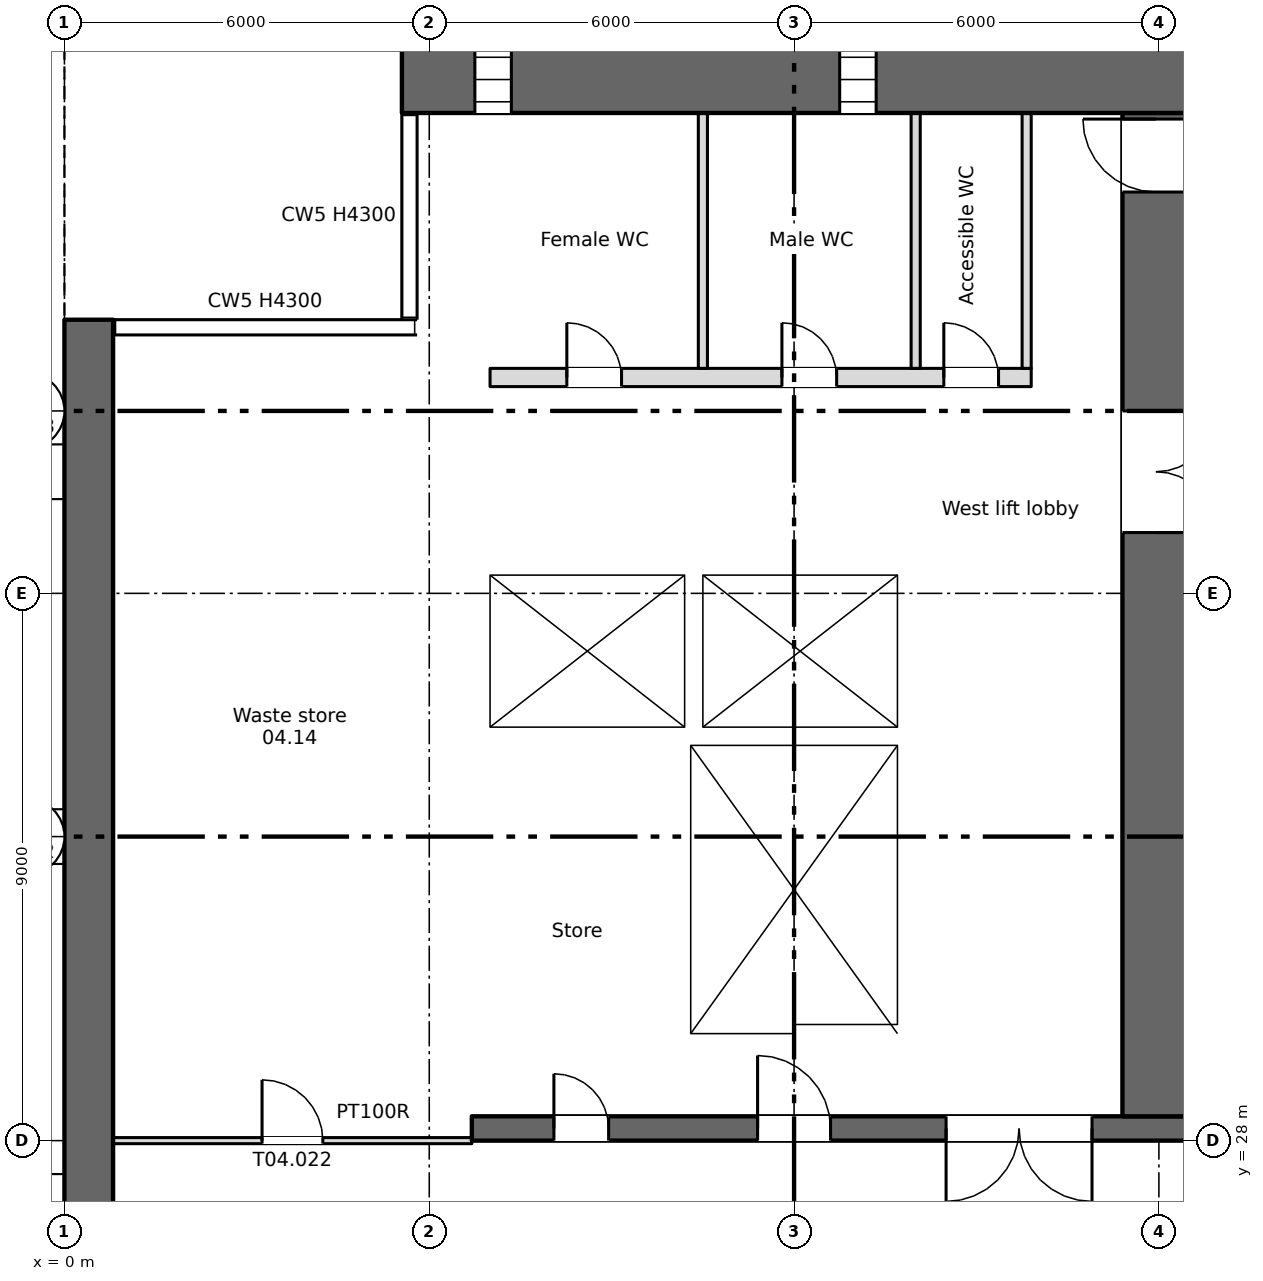
"""IFC4 building model, lengths in metres.
Left out: names, types, materials, properties, quantities, classifications, styles, units other than length and angle.
Written with IfcOpenShell. Run it as: python <this file> out.ifc"""

import sys

from ifc_helpers import new_model, si_unit, direction, frame, frame_2d, origin, place, context, subcontext, project, spatial, rectangle, extrude, element, fill, save


model = new_model("IFC4")
c1 = context("Model", 3, precision=1e-05, world=origin(), true_north=direction((0.0, 1.0)))
c2 = subcontext(c1, "Body", "Model", "MODEL_VIEW")
j1 = project(units=[si_unit("LENGTHUNIT", "METRE"), si_unit("PLANEANGLEUNIT", "RADIAN")], contexts=[c1])
p1 = place(None, origin())
s1 = spatial("IfcSite", under=j1, at=p1, CompositionType="ELEMENT")
p2 = place(p1, origin())
s2 = spatial("IfcBuilding", under=s1, at=p2, CompositionType="ELEMENT")
p3 = place(p2, frame((0.0, 0.0, 6.5)))
s3 = spatial("IfcBuildingStorey", under=s2, at=p3, CompositionType="ELEMENT", Elevation=6.5)
p4 = place(p3, frame((0.4, 4.5, 0.0), z_axis=(0.0, 0.0, 1.0), x_axis=(0.0, 1.0, 0.0)))
e1 = element("IfcWall", 1, at=p4, inside=s3, PredefinedType="SHEAR", context=c2, shape_type="SweptSolid", body=[
    extrude(rectangle(XDim=37.0, YDim=0.8, at=frame_2d((18.5, 0.0))), origin(), (0.0, 0.0, 1.0), 4.3),
])
p5 = place(p4, frame((1.2, 0.0, 0.6)))
e2 = element("IfcOpeningElement", 2, at=p5, cuts=e1, PredefinedType="OPENING", context=c2, shape_type="SweptSolid", body=[
    extrude(rectangle(XDim=0.6, YDim=2.7, at=frame_2d((0.3, 1.35))), frame((0.0, 0.41, 0.0), z_axis=(0.0, -1.0, 0.0), x_axis=(1.0, 0.0, 0.0)), (0.0, 0.0, 1.0), 0.82),
])
p6 = place(p4, frame((7.2, 0.0, 0.6)))
e3 = element("IfcOpeningElement", 3, at=p6, cuts=e1, PredefinedType="OPENING", context=c2, shape_type="SweptSolid", body=[
    extrude(rectangle(XDim=0.6, YDim=2.7, at=frame_2d((0.3, 1.35))), frame((0.0, 0.41, 0.0), z_axis=(0.0, -1.0, 0.0), x_axis=(1.0, 0.0, 0.0)), (0.0, 0.0, 1.0), 0.82),
])
p7 = place(p4, frame((13.2, 0.0, 0.6)))
e4 = element("IfcOpeningElement", 4, at=p7, cuts=e1, PredefinedType="OPENING", context=c2, shape_type="SweptSolid", body=[
    extrude(rectangle(XDim=0.6, YDim=2.7, at=frame_2d((0.3, 1.35))), frame((0.0, 0.41, 0.0), z_axis=(0.0, -1.0, 0.0), x_axis=(1.0, 0.0, 0.0)), (0.0, 0.0, 1.0), 0.82),
])
p8 = place(p4, frame((19.2, 0.0, 0.6)))
e5 = element("IfcOpeningElement", 5, at=p8, cuts=e1, PredefinedType="OPENING", context=c2, shape_type="SweptSolid", body=[
    extrude(rectangle(XDim=0.6, YDim=2.7, at=frame_2d((0.3, 1.35))), frame((0.0, 0.41, 0.0), z_axis=(0.0, -1.0, 0.0), x_axis=(1.0, 0.0, 0.0)), (0.0, 0.0, 1.0), 0.82),
])
p9 = place(p3, frame((5.55, 45.45, 0.0), z_axis=(0.0, 0.0, 1.0), x_axis=(1.0, 0.0, 0.0)))
e6 = element("IfcWall", 6, at=p9, inside=s3, PredefinedType="SHEAR", context=c2, shape_type="SweptSolid", body=[
    extrude(rectangle(XDim=66.9, YDim=1.1, at=frame_2d((33.45, 0.0))), origin(), (0.0, 0.0, 1.0), 4.3),
])
p10 = place(p9, frame((1.2, 0.0, 0.6)))
e7 = element("IfcOpeningElement", 7, at=p10, cuts=e6, PredefinedType="OPENING", context=c2, shape_type="SweptSolid", body=[
    extrude(rectangle(XDim=0.6, YDim=2.7, at=frame_2d((0.3, 1.35))), frame((0.0, 0.56, 0.0), z_axis=(0.0, -1.0, 0.0), x_axis=(1.0, 0.0, 0.0)), (0.0, 0.0, 1.0), 1.12),
])
p11 = place(p9, frame((7.2, 0.0, 0.6)))
e8 = element("IfcOpeningElement", 8, at=p11, cuts=e6, PredefinedType="OPENING", context=c2, shape_type="SweptSolid", body=[
    extrude(rectangle(XDim=0.6, YDim=2.7, at=frame_2d((0.3, 1.35))), frame((0.0, 0.56, 0.0), z_axis=(0.0, -1.0, 0.0), x_axis=(1.0, 0.0, 0.0)), (0.0, 0.0, 1.0), 1.12),
])
p12 = place(p9, frame((61.2, 0.0, 0.6)))
e9 = element("IfcOpeningElement", 9, at=p12, cuts=e6, PredefinedType="OPENING", context=c2, shape_type="SweptSolid", body=[
    extrude(rectangle(XDim=0.6, YDim=2.7, at=frame_2d((0.3, 1.35))), frame((0.0, 0.56, 0.0), z_axis=(0.0, -1.0, 0.0), x_axis=(1.0, 0.0, 0.0)), (0.0, 0.0, 1.0), 1.12),
])
p13 = place(p3, frame((6.7, 28.2, 0.0), z_axis=(0.0, 0.0, 1.0), x_axis=(1.0, 0.0, 0.0)))
e10 = element("IfcWall", 10, at=p13, inside=s3, PredefinedType="SHEAR", context=c2, shape_type="SweptSolid", body=[
    extrude(rectangle(XDim=66.3, YDim=0.4, at=frame_2d((33.15, 0.0))), origin(), (0.0, 0.0, 1.0), 4.3),
])
p14 = place(p13, frame((13.85, 0.0, 0.0)))
e11 = element("IfcOpeningElement", 11, at=p14, cuts=e10, PredefinedType="OPENING", context=c2, shape_type="SweptSolid", body=[
    extrude(rectangle(XDim=0.9, YDim=2.1, at=frame_2d((0.45, 1.05))), frame((0.0, 0.21, 0.0), z_axis=(0.0, -1.0, 0.0), x_axis=(1.0, 0.0, 0.0)), (0.0, 0.0, 1.0), 0.42),
])
p15 = place(p13, frame((48.562, 0.0, 0.0)))
e12 = element("IfcOpeningElement", 12, at=p15, cuts=e10, PredefinedType="OPENING", context=c2, shape_type="SweptSolid", body=[
    extrude(rectangle(XDim=0.9, YDim=2.1, at=frame_2d((0.45, 1.05))), frame((0.0, 0.21, 0.0), z_axis=(0.0, -1.0, 0.0), x_axis=(1.0, 0.0, 0.0)), (0.0, 0.0, 1.0), 0.42),
])
p16 = place(p13, frame((51.137, 0.0, 0.0)))
e13 = element("IfcOpeningElement", 13, at=p16, cuts=e10, PredefinedType="OPENING", context=c2, shape_type="SweptSolid", body=[
    extrude(rectangle(XDim=0.9, YDim=2.1, at=frame_2d((0.45, 1.05))), frame((0.0, 0.21, 0.0), z_axis=(0.0, -1.0, 0.0), x_axis=(1.0, 0.0, 0.0)), (0.0, 0.0, 1.0), 0.42),
])
p17 = place(p13, frame((1.35, 0.0, 0.0)))
e14 = element("IfcOpeningElement", 14, at=p17, cuts=e10, PredefinedType="OPENING", context=c2, shape_type="SweptSolid", body=[
    extrude(rectangle(XDim=0.9, YDim=2.1, at=frame_2d((0.45, 1.05))), frame((0.0, 0.21, 0.0), z_axis=(0.0, -1.0, 0.0), x_axis=(1.0, 0.0, 0.0)), (0.0, 0.0, 1.0), 0.42),
])
p18 = place(p13, frame((59.363, 0.0, 0.0)))
e15 = element("IfcOpeningElement", 15, at=p18, cuts=e10, PredefinedType="OPENING", context=c2, shape_type="SweptSolid", body=[
    extrude(rectangle(XDim=0.9, YDim=2.1, at=frame_2d((0.45, 1.05))), frame((0.0, 0.21, 0.0), z_axis=(0.0, -1.0, 0.0), x_axis=(1.0, 0.0, 0.0)), (0.0, 0.0, 1.0), 0.42),
])
p19 = place(p13, frame((63.538, 0.0, 0.0)))
e16 = element("IfcOpeningElement", 16, at=p19, cuts=e10, PredefinedType="OPENING", context=c2, shape_type="SweptSolid", body=[
    extrude(rectangle(XDim=0.9, YDim=2.1, at=frame_2d((0.45, 1.05))), frame((0.0, 0.21, 0.0), z_axis=(0.0, -1.0, 0.0), x_axis=(1.0, 0.0, 0.0)), (0.0, 0.0, 1.0), 0.42),
])
p20 = place(p13, frame((4.7, 0.0, 0.0)))
e17 = element("IfcOpeningElement", 17, at=p20, cuts=e10, PredefinedType="OPENING", context=c2, shape_type="SweptSolid", body=[
    extrude(rectangle(XDim=1.2, YDim=2.1, at=frame_2d((0.6, 1.05))), frame((0.0, 0.21, 0.0), z_axis=(0.0, -1.0, 0.0), x_axis=(1.0, 0.0, 0.0)), (0.0, 0.0, 1.0), 0.42),
])
p21 = place(p13, frame((31.7, 0.0, 0.0)))
e18 = element("IfcOpeningElement", 18, at=p21, cuts=e10, PredefinedType="OPENING", context=c2, shape_type="SweptSolid", body=[
    extrude(rectangle(XDim=1.2, YDim=2.1, at=frame_2d((0.6, 1.05))), frame((0.0, 0.21, 0.0), z_axis=(0.0, -1.0, 0.0), x_axis=(1.0, 0.0, 0.0)), (0.0, 0.0, 1.0), 0.42),
])
p22 = place(p13, frame((55.2, 0.0, 0.0)))
e19 = element("IfcOpeningElement", 19, at=p22, cuts=e10, PredefinedType="OPENING", context=c2, shape_type="SweptSolid", body=[
    extrude(rectangle(XDim=1.2, YDim=2.1, at=frame_2d((0.6, 1.05))), frame((0.0, 0.21, 0.0), z_axis=(0.0, -1.0, 0.0), x_axis=(1.0, 0.0, 0.0)), (0.0, 0.0, 1.0), 0.42),
])
p23 = place(p13, frame((21.7, 0.0, 0.0)))
e20 = element("IfcOpeningElement", 20, at=p23, cuts=e10, PredefinedType="OPENING", context=c2, shape_type="SweptSolid", body=[
    extrude(rectangle(XDim=1.2, YDim=2.1, at=frame_2d((0.6, 1.05))), frame((0.0, 0.21, 0.0), z_axis=(0.0, -1.0, 0.0), x_axis=(1.0, 0.0, 0.0)), (0.0, 0.0, 1.0), 0.42),
])
p24 = place(p13, frame((41.7, 0.0, 0.0)))
e21 = element("IfcOpeningElement", 21, at=p24, cuts=e10, PredefinedType="OPENING", context=c2, shape_type="SweptSolid", body=[
    extrude(rectangle(XDim=1.2, YDim=2.1, at=frame_2d((0.6, 1.05))), frame((0.0, 0.21, 0.0), z_axis=(0.0, -1.0, 0.0), x_axis=(1.0, 0.0, 0.0)), (0.0, 0.0, 1.0), 0.42),
])
p25 = place(p13, frame((24.85, 0.0, 0.0)))
e22 = element("IfcOpeningElement", 22, at=p25, cuts=e10, PredefinedType="OPENING", context=c2, shape_type="SweptSolid", body=[
    extrude(rectangle(XDim=2.4, YDim=2.1, at=frame_2d((1.2, 1.05))), frame((0.0, 0.21, 0.0), z_axis=(0.0, -1.0, 0.0), x_axis=(1.0, 0.0, 0.0)), (0.0, 0.0, 1.0), 0.42),
])
p26 = place(p13, frame((37.35, 0.0, 0.0)))
e23 = element("IfcOpeningElement", 23, at=p26, cuts=e10, PredefinedType="OPENING", context=c2, shape_type="SweptSolid", body=[
    extrude(rectangle(XDim=2.4, YDim=2.1, at=frame_2d((1.2, 1.05))), frame((0.0, 0.21, 0.0), z_axis=(0.0, -1.0, 0.0), x_axis=(1.0, 0.0, 0.0)), (0.0, 0.0, 1.0), 0.42),
])
p27 = place(p13, frame((7.8, 0.0, 0.0)))
e24 = element("IfcOpeningElement", 24, at=p27, cuts=e10, PredefinedType="OPENING", context=c2, shape_type="SweptSolid", body=[
    extrude(rectangle(XDim=2.4, YDim=2.1, at=frame_2d((1.2, 1.05))), frame((0.0, 0.21, 0.0), z_axis=(0.0, -1.0, 0.0), x_axis=(1.0, 0.0, 0.0)), (0.0, 0.0, 1.0), 0.42),
])
p28 = place(p13, frame((28.85, 0.0, 0.0)))
e25 = element("IfcOpeningElement", 25, at=p28, cuts=e10, PredefinedType="OPENING", context=c2, shape_type="SweptSolid", body=[
    extrude(rectangle(XDim=0.9, YDim=2.1, at=frame_2d((0.45, 1.05))), frame((0.0, 0.21, 0.0), z_axis=(0.0, -1.0, 0.0), x_axis=(1.0, 0.0, 0.0)), (0.0, 0.0, 1.0), 0.42),
])
p29 = place(p13, frame((34.85, 0.0, 0.0)))
e26 = element("IfcOpeningElement", 26, at=p29, cuts=e10, PredefinedType="OPENING", context=c2, shape_type="SweptSolid", body=[
    extrude(rectangle(XDim=0.9, YDim=2.1, at=frame_2d((0.45, 1.05))), frame((0.0, 0.21, 0.0), z_axis=(0.0, -1.0, 0.0), x_axis=(1.0, 0.0, 0.0)), (0.0, 0.0, 1.0), 0.42),
])
p30 = place(p3, frame((6.85, 28.4, 0.0), z_axis=(0.0, 0.0, 1.0), x_axis=(0.0, 1.0, 0.0)))
e27 = element("IfcWall", 27, at=p30, inside=s3, PredefinedType="SHEAR", context=c2, shape_type="SweptSolid", body=[
    extrude(rectangle(XDim=16.5, YDim=0.3, at=frame_2d((8.25, 0.0))), origin(), (0.0, 0.0, 1.0), 4.3),
])
p31 = place(p3, frame((17.95, 28.4, 0.0), z_axis=(0.0, 0.0, 1.0), x_axis=(0.0, 1.0, 0.0)))
e28 = element("IfcWall", 28, at=p31, inside=s3, PredefinedType="SHEAR", context=c2, shape_type="SweptSolid", body=[
    extrude(rectangle(XDim=16.5, YDim=1.1, at=frame_2d((8.25, 0.0))), origin(), (0.0, 0.0, 1.0), 4.3),
])
p32 = place(p31, frame((9.6, 0.0, 0.0)))
e29 = element("IfcOpeningElement", 29, at=p32, cuts=e28, PredefinedType="OPENING", context=c2, shape_type="SweptSolid", body=[
    extrude(rectangle(XDim=2.0, YDim=2.1, at=frame_2d((1.0, 1.05))), frame((0.0, 0.56, 0.0), z_axis=(0.0, -1.0, 0.0), x_axis=(1.0, 0.0, 0.0)), (0.0, 0.0, 1.0), 1.12),
])
p33 = place(p31, frame((15.2, 0.0, 0.0)))
e30 = element("IfcOpeningElement", 30, at=p33, cuts=e28, PredefinedType="OPENING", context=c2, shape_type="SweptSolid", body=[
    extrude(rectangle(XDim=1.2, YDim=2.1, at=frame_2d((0.6, 1.05))), frame((0.0, 0.56, 0.0), z_axis=(0.0, -1.0, 0.0), x_axis=(1.0, 0.0, 0.0)), (0.0, 0.0, 1.0), 1.12),
])
for number, where, z_axis, x_axis in (
    (31, (10.15, 28.4, 0.0), (0.0, 0.0, 1.0), (0.0, 1.0, 0.0)),
    (32, (13.85, 28.4, 0.0), (0.0, 0.0, 1.0), (0.0, 1.0, 0.0)),
):
    element("IfcWall", number, at=place(p3, frame(where, z_axis=z_axis, x_axis=x_axis)), inside=s3, PredefinedType="SHEAR", context=c2, shape_type="SweptSolid", body=[
        extrude(rectangle(XDim=6.1, YDim=0.3, at=frame_2d((3.05, 0.0))), origin(), (0.0, 0.0, 1.0), 4.3),
    ])
for number, where, z_axis, x_axis in (
    (33, (7.0, 34.65, 0.0), (0.0, 0.0, 1.0), (1.0, 0.0, 0.0)),
    (34, (7.0, 37.45, 0.0), (0.0, 0.0, 1.0), (1.0, 0.0, 0.0)),
):
    element("IfcWall", number, at=place(p3, frame(where, z_axis=z_axis, x_axis=x_axis)), inside=s3, PredefinedType="SHEAR", context=c2, shape_type="SweptSolid", body=[
        extrude(rectangle(XDim=7.0, YDim=0.3, at=frame_2d((3.5, 0.0))), origin(), (0.0, 0.0, 1.0), 4.3),
    ])
p34 = place(p3, frame((13.85, 34.8, 0.0), z_axis=(0.0, 0.0, 1.0), x_axis=(0.0, 1.0, 0.0)))
e35 = element("IfcWall", 35, at=p34, inside=s3, PredefinedType="SHEAR", context=c2, shape_type="SweptSolid", body=[
    extrude(rectangle(XDim=2.5, YDim=0.3, at=frame_2d((1.25, 0.0))), origin(), (0.0, 0.0, 1.0), 4.3),
])
p35 = place(p3, frame((7.0, 40.55, 0.0), z_axis=(0.0, 0.0, 1.0), x_axis=(1.0, 0.0, 0.0)))
e36 = element("IfcWall", 36, at=p35, inside=s3, PredefinedType="PARTITIONING", context=c2, shape_type="SweptSolid", body=[
    extrude(rectangle(XDim=8.9, YDim=0.3, at=frame_2d((4.45, 0.0))), origin(), (0.0, 0.0, 1.0), 4.3),
])
p36 = place(p35, frame((1.262, 0.0, 0.0)))
e37 = element("IfcOpeningElement", 37, at=p36, cuts=e36, PredefinedType="OPENING", context=c2, shape_type="SweptSolid", body=[
    extrude(rectangle(XDim=0.9, YDim=2.1, at=frame_2d((0.45, 1.05))), frame((0.0, 0.16, 0.0), z_axis=(0.0, -1.0, 0.0), x_axis=(1.0, 0.0, 0.0)), (0.0, 0.0, 1.0), 0.32),
])
p37 = place(p35, frame((4.8, 0.0, 0.0)))
e38 = element("IfcOpeningElement", 38, at=p37, cuts=e36, PredefinedType="OPENING", context=c2, shape_type="SweptSolid", body=[
    extrude(rectangle(XDim=0.9, YDim=2.1, at=frame_2d((0.45, 1.05))), frame((0.0, 0.16, 0.0), z_axis=(0.0, -1.0, 0.0), x_axis=(1.0, 0.0, 0.0)), (0.0, 0.0, 1.0), 0.32),
])
p38 = place(p35, frame((7.462, 0.0, 0.0)))
e39 = element("IfcOpeningElement", 39, at=p38, cuts=e36, PredefinedType="OPENING", context=c2, shape_type="SweptSolid", body=[
    extrude(rectangle(XDim=0.9, YDim=2.1, at=frame_2d((0.45, 1.05))), frame((0.0, 0.16, 0.0), z_axis=(0.0, -1.0, 0.0), x_axis=(1.0, 0.0, 0.0)), (0.0, 0.0, 1.0), 0.32),
])
p39 = place(p3, frame((10.35, 34.8, 0.0), z_axis=(0.0, 0.0, 1.0), x_axis=(0.0, 1.0, 0.0)))
e40 = element("IfcWall", 40, at=p39, inside=s3, PredefinedType="SHEAR", context=c2, shape_type="SweptSolid", body=[
    extrude(rectangle(XDim=2.5, YDim=0.3, at=frame_2d((1.25, 0.0))), origin(), (0.0, 0.0, 1.0), 4.3),
])
for number, where, z_axis, x_axis in (
    (41, (15.825, 40.7, 0.0), (0.0, 0.0, 1.0), (0.0, 1.0, 0.0)),
    (42, (10.5, 40.7, 0.0), (0.0, 0.0, 1.0), (0.0, 1.0, 0.0)),
    (43, (14.0, 40.7, 0.0), (0.0, 0.0, 1.0), (0.0, 1.0, 0.0)),
):
    element("IfcWall", number, at=place(p3, frame(where, z_axis=z_axis, x_axis=x_axis)), inside=s3, PredefinedType="PARTITIONING", context=c2, shape_type="SweptSolid", body=[
        extrude(rectangle(XDim=4.2, YDim=0.15, at=frame_2d((2.1, 0.0))), origin(), (0.0, 0.0, 1.0), 4.3),
    ])
p40 = place(p3, frame((0.8, 28.0, 0.0), z_axis=(0.0, 0.0, 1.0), x_axis=(1.0, 0.0, 0.0)))
e44 = element("IfcWall", 44, at=p40, inside=s3, PredefinedType="PARTITIONING", context=c2, shape_type="SweptSolid", body=[
    extrude(rectangle(XDim=5.9, YDim=0.1, at=frame_2d((2.95, 0.0))), origin(), (0.0, 0.0, 1.0), 4.3),
])
p41 = place(p40, frame((2.45, 0.0, 0.0)))
e45 = element("IfcOpeningElement", 45, at=p41, cuts=e44, PredefinedType="OPENING", context=c2, shape_type="SweptSolid", body=[
    extrude(rectangle(XDim=1.0, YDim=2.1, at=frame_2d((0.5, 1.05))), frame((0.0, 0.06, 0.0), z_axis=(0.0, -1.0, 0.0), x_axis=(1.0, 0.0, 0.0)), (0.0, 0.0, 1.0), 0.12),
])
p42 = place(p10, origin())
e46 = element("IfcWindow", 46, at=p42, inside=s3, PartitioningType="SINGLE_PANEL", PredefinedType="WINDOW", context=c2, shape_type="SweptSolid", body=[
    extrude(rectangle(XDim=0.6, YDim=2.7, at=frame_2d((0.3, 1.35))), frame((0.0, 0.03, 0.0), z_axis=(0.0, -1.0, 0.0), x_axis=(1.0, 0.0, 0.0)), (0.0, 0.0, 1.0), 0.06),
])
fill(e7, e46)
p43 = place(p11, origin())
e47 = element("IfcWindow", 47, at=p43, inside=s3, PartitioningType="SINGLE_PANEL", PredefinedType="WINDOW", context=c2, shape_type="SweptSolid", body=[
    extrude(rectangle(XDim=0.6, YDim=2.7, at=frame_2d((0.3, 1.35))), frame((0.0, 0.03, 0.0), z_axis=(0.0, -1.0, 0.0), x_axis=(1.0, 0.0, 0.0)), (0.0, 0.0, 1.0), 0.06),
])
fill(e8, e47)
p44 = place(p17, origin())
e48 = element("IfcDoor", 48, at=p44, inside=s3, OperationType="SINGLE_SWING_LEFT", PredefinedType="DOOR", context=c2, shape_type="SweptSolid", body=[
    extrude(rectangle(XDim=0.9, YDim=2.1, at=frame_2d((0.45, 1.05))), frame((0.0, 0.025, 0.0), z_axis=(0.0, -1.0, 0.0), x_axis=(1.0, 0.0, 0.0)), (0.0, 0.0, 1.0), 0.05),
])
fill(e14, e48)
p45 = place(p36, origin())
e49 = element("IfcDoor", 49, at=p45, inside=s3, OperationType="SINGLE_SWING_LEFT", PredefinedType="DOOR", context=c2, shape_type="SweptSolid", body=[
    extrude(rectangle(XDim=0.9, YDim=2.1, at=frame_2d((0.45, 1.05))), frame((0.0, 0.025, 0.0), z_axis=(0.0, -1.0, 0.0), x_axis=(1.0, 0.0, 0.0)), (0.0, 0.0, 1.0), 0.05),
])
fill(e37, e49)
p46 = place(p37, origin())
e50 = element("IfcDoor", 50, at=p46, inside=s3, OperationType="SINGLE_SWING_LEFT", PredefinedType="DOOR", context=c2, shape_type="SweptSolid", body=[
    extrude(rectangle(XDim=0.9, YDim=2.1, at=frame_2d((0.45, 1.05))), frame((0.0, 0.025, 0.0), z_axis=(0.0, -1.0, 0.0), x_axis=(1.0, 0.0, 0.0)), (0.0, 0.0, 1.0), 0.05),
])
fill(e38, e50)
p47 = place(p38, origin())
e51 = element("IfcDoor", 51, at=p47, inside=s3, OperationType="SINGLE_SWING_LEFT", PredefinedType="DOOR", context=c2, shape_type="SweptSolid", body=[
    extrude(rectangle(XDim=0.9, YDim=2.1, at=frame_2d((0.45, 1.05))), frame((0.0, 0.025, 0.0), z_axis=(0.0, -1.0, 0.0), x_axis=(1.0, 0.0, 0.0)), (0.0, 0.0, 1.0), 0.05),
])
fill(e39, e51)
p48 = place(p20, origin())
e52 = element("IfcDoor", 52, at=p48, inside=s3, OperationType="SINGLE_SWING_LEFT", PredefinedType="DOOR", context=c2, shape_type="SweptSolid", body=[
    extrude(rectangle(XDim=1.2, YDim=2.1, at=frame_2d((0.6, 1.05))), frame((0.0, 0.025, 0.0), z_axis=(0.0, -1.0, 0.0), x_axis=(1.0, 0.0, 0.0)), (0.0, 0.0, 1.0), 0.05),
])
fill(e17, e52)
p49 = place(p27, origin())
e53 = element("IfcDoor", 53, at=p49, inside=s3, OperationType="DOUBLE_DOOR_SINGLE_SWING", PredefinedType="DOOR", context=c2, shape_type="SweptSolid", body=[
    extrude(rectangle(XDim=2.4, YDim=2.1, at=frame_2d((1.2, 1.05))), frame((0.0, 0.025, 0.0), z_axis=(0.0, -1.0, 0.0), x_axis=(1.0, 0.0, 0.0)), (0.0, 0.0, 1.0), 0.05),
])
fill(e24, e53)
p50 = place(p32, origin())
e54 = element("IfcDoor", 54, at=p50, inside=s3, OperationType="DOUBLE_DOOR_SINGLE_SWING", PredefinedType="DOOR", context=c2, shape_type="SweptSolid", body=[
    extrude(rectangle(XDim=2.0, YDim=2.1, at=frame_2d((1.0, 1.05))), frame((0.0, 0.025, 0.0), z_axis=(0.0, -1.0, 0.0), x_axis=(1.0, 0.0, 0.0)), (0.0, 0.0, 1.0), 0.05),
])
fill(e29, e54)
p51 = place(p33, origin())
e55 = element("IfcDoor", 55, at=p51, inside=s3, OperationType="SINGLE_SWING_RIGHT", PredefinedType="DOOR", context=c2, shape_type="SweptSolid", body=[
    extrude(rectangle(XDim=1.2, YDim=2.1, at=frame_2d((0.6, 1.05))), frame((0.0, 0.025, 0.0), z_axis=(0.0, -1.0, 0.0), x_axis=(1.0, 0.0, 0.0)), (0.0, 0.0, 1.0), 0.05),
])
fill(e30, e55)
p52 = place(p41, origin())
e56 = element("IfcDoor", 56, at=p52, inside=s3, OperationType="SINGLE_SWING_LEFT", PredefinedType="DOOR", context=c2, shape_type="SweptSolid", body=[
    extrude(rectangle(XDim=1.0, YDim=2.1, at=frame_2d((0.5, 1.05))), frame((0.0, 0.025, 0.0), z_axis=(0.0, -1.0, 0.0), x_axis=(1.0, 0.0, 0.0)), (0.0, 0.0, 1.0), 0.05),
])
fill(e45, e56)
save(model, sys.argv[1])
